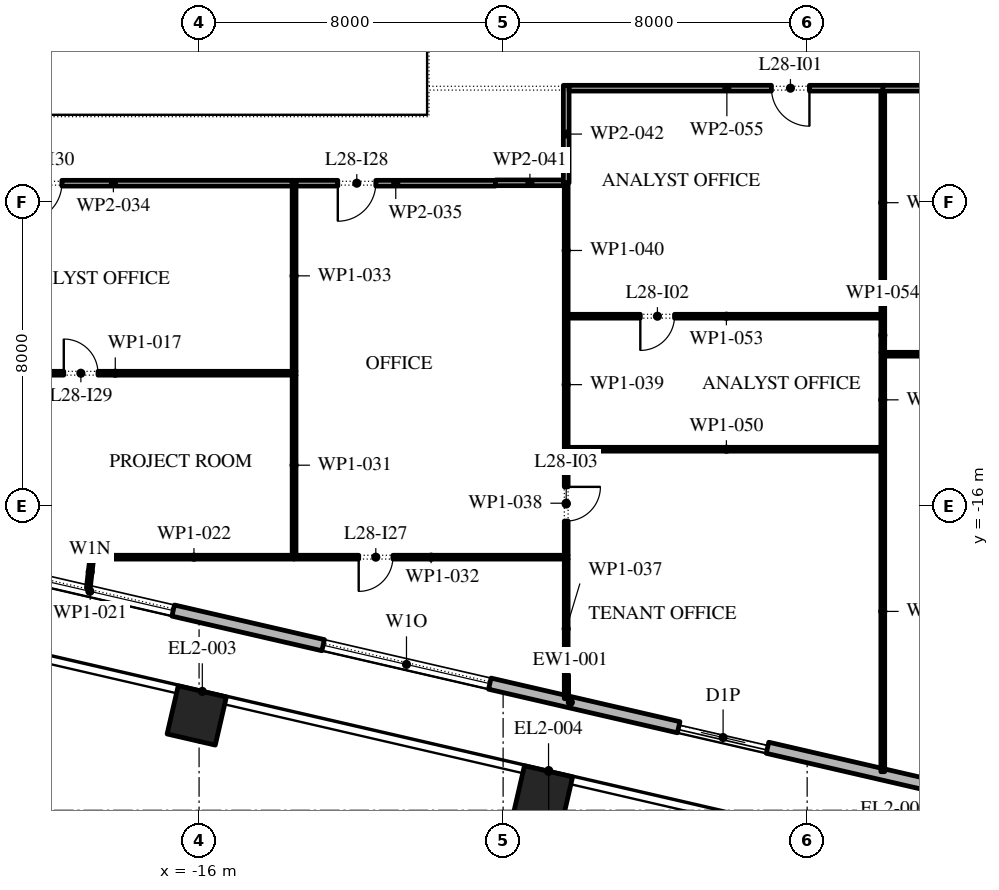
"""IFC4 building model, lengths in metres.
Left out: names, types, materials, properties, quantities, classifications, styles, units other than length and angle.
Written with IfcOpenShell. Run it as: python <this file> out.ifc"""

import sys

from ifc_helpers import new_model, si_unit, direction, frame, frame_2d, origin, origin_2d, place, context, subcontext, project, spatial, rectangle, extrude, element, fill, save


model = new_model("IFC4")
c1 = context("Model", 3, precision=1e-05, world=origin(), true_north=direction((0.0, 1.0)))
c2 = subcontext(c1, "Body", "Model", "MODEL_VIEW")
j1 = project(units=[si_unit("LENGTHUNIT", "METRE"), si_unit("PLANEANGLEUNIT", "RADIAN")], contexts=[c1])
p1 = place(None, origin())
s1 = spatial("IfcSite", under=j1, at=p1, CompositionType="ELEMENT")
p2 = place(p1, origin())
s2 = spatial("IfcBuilding", under=s1, at=p2, CompositionType="ELEMENT")
p3 = place(p2, frame((0.0, 0.0, 130.8)))
s3 = spatial("IfcBuildingStorey", under=s2, at=p3, CompositionType="ELEMENT", Elevation=130.8)
for number, where, z_axis, x_axis in (
    (1, (-16.061, -21.505, 0.0), (0.0, 0.0, 1.0), (0.974, -0.225, 0.0)),
    (2, (-6.951, -23.608, 0.0), (0.0, 0.0, 1.0), (0.974, -0.225, 0.0)),
):
    element("IfcColumn", number, at=place(p3, frame(where, z_axis=z_axis, x_axis=x_axis)), inside=s3, PredefinedType="COLUMN", context=c2, shape_type="SweptSolid", body=[
        extrude(rectangle(XDim=1.3, YDim=1.3, at=origin_2d()), origin(), (0.0, 0.0, 1.0), 4.2),
    ])
p4 = place(p3, frame((-31.078, -15.421, 0.0), z_axis=(0.0, 0.0, 1.0), x_axis=(0.974370456532, -0.224949357493, 0.0)))
e3 = element("IfcWall", 3, at=p4, inside=s3, PredefinedType="STANDARD", context=c2, shape_type="SweptSolid", body=[
    extrude(rectangle(XDim=51.0, YDim=0.3, at=frame_2d((25.5, 0.0))), origin(), (0.0, 0.0, 1.0), 4.0),
])
p5 = place(p4, frame((1.875, 0.0, 0.45)))
e4 = element("IfcOpeningElement", 4, at=p5, cuts=e3, PredefinedType="OPENING", context=c2, shape_type="SweptSolid", body=[
    extrude(rectangle(XDim=4.5, YDim=2.65, at=frame_2d((2.25, 1.325))), frame((0.0, 0.16, 0.0), z_axis=(0.0, -1.0, 0.0), x_axis=(1.0, 0.0, 0.0)), (0.0, 0.0, 1.0), 0.32),
])
p6 = place(p4, frame((10.275, 0.0, 0.45)))
e5 = element("IfcOpeningElement", 5, at=p6, cuts=e3, PredefinedType="OPENING", context=c2, shape_type="SweptSolid", body=[
    extrude(rectangle(XDim=4.5, YDim=2.525, at=frame_2d((2.25, 1.262))), frame((0.0, 0.16, 0.0), z_axis=(0.0, -1.0, 0.0), x_axis=(1.0, 0.0, 0.0)), (0.0, 0.0, 1.0), 0.32),
])
p7 = place(p4, frame((18.825, 0.0, 0.45)))
e6 = element("IfcOpeningElement", 6, at=p7, cuts=e3, PredefinedType="OPENING", context=c2, shape_type="SweptSolid", body=[
    extrude(rectangle(XDim=4.5, YDim=2.5, at=frame_2d((2.25, 1.25))), frame((0.0, 0.16, 0.0), z_axis=(0.0, -1.0, 0.0), x_axis=(1.0, 0.0, 0.0)), (0.0, 0.0, 1.0), 0.32),
])
p8 = place(p4, frame((28.425, 0.0, 0.0)))
e7 = element("IfcOpeningElement", 7, at=p8, cuts=e3, PredefinedType="OPENING", context=c2, shape_type="SweptSolid", body=[
    extrude(rectangle(XDim=2.4, YDim=2.9, at=frame_2d((1.2, 1.45))), frame((0.0, 0.16, 0.0), z_axis=(0.0, -1.0, 0.0), x_axis=(1.0, 0.0, 0.0)), (0.0, 0.0, 1.0), 0.32),
])
p9 = place(p4, frame((35.925, 0.0, 0.45)))
e8 = element("IfcOpeningElement", 8, at=p9, cuts=e3, PredefinedType="OPENING", context=c2, shape_type="SweptSolid", body=[
    extrude(rectangle(XDim=4.5, YDim=2.45, at=frame_2d((2.25, 1.225))), frame((0.0, 0.16, 0.0), z_axis=(0.0, -1.0, 0.0), x_axis=(1.0, 0.0, 0.0)), (0.0, 0.0, 1.0), 0.32),
])
p10 = place(p4, frame((44.475, 0.0, 0.45)))
e9 = element("IfcOpeningElement", 9, at=p10, cuts=e3, PredefinedType="OPENING", context=c2, shape_type="SweptSolid", body=[
    extrude(rectangle(XDim=4.5, YDim=2.45, at=frame_2d((2.25, 1.225))), frame((0.0, 0.16, 0.0), z_axis=(0.0, -1.0, 0.0), x_axis=(1.0, 0.0, 0.0)), (0.0, 0.0, 1.0), 0.32),
])
p11 = place(p3, frame((-22.96, -12.5, 0.0), z_axis=(0.0, 0.0, 1.0), x_axis=(1.0, 0.0, 0.0)))
e10 = element("IfcWall", 10, at=p11, inside=s3, PredefinedType="PARTITIONING", context=c2, shape_type="SweptSolid", body=[
    extrude(rectangle(XDim=9.51, YDim=0.1, at=frame_2d((4.755, 0.0))), origin(), (0.0, 0.0, 1.0), 4.0),
])
p12 = place(p11, frame((3.4, 0.0, 0.0)))
e11 = element("IfcOpeningElement", 11, at=p12, cuts=e10, PredefinedType="OPENING", context=c2, shape_type="SweptSolid", body=[
    extrude(rectangle(XDim=0.9, YDim=2.1, at=frame_2d((0.45, 1.05))), frame((0.0, 0.06, 0.0), z_axis=(0.0, -1.0, 0.0), x_axis=(1.0, 0.0, 0.0)), (0.0, 0.0, 1.0), 0.12),
])
p13 = place(p3, frame((-18.915, -18.157, 0.0), z_axis=(0.0, 0.0, 1.0), x_axis=(0.11580251051, 0.993272258024, 0.0)))
e12 = element("IfcWall", 12, at=p13, inside=s3, PredefinedType="PARTITIONING", context=c2, shape_type="SweptSolid", body=[
    extrude(rectangle(XDim=0.873, YDim=0.1, at=frame_2d((0.437, 0.0))), origin(), (0.0, 0.0, 1.0), 4.0),
])
p14 = place(p3, frame((-18.77, -17.34, 0.0), z_axis=(0.0, 0.0, 1.0), x_axis=(1.0, 0.0, 0.0)))
e13 = element("IfcWall", 13, at=p14, inside=s3, PredefinedType="PARTITIONING", context=c2, shape_type="SweptSolid", body=[
    extrude(rectangle(XDim=5.27, YDim=0.1, at=frame_2d((2.635, 0.0))), origin(), (0.0, 0.0, 1.0), 4.0),
])
p15 = place(p3, frame((-13.5, -17.29, 0.0), z_axis=(0.0, 0.0, 1.0), x_axis=(0.0, 1.0, 0.0)))
e14 = element("IfcWall", 14, at=p15, inside=s3, PredefinedType="PARTITIONING", context=c2, shape_type="SweptSolid", body=[
    extrude(rectangle(XDim=4.74, YDim=0.1, at=frame_2d((2.37, 0.0))), origin(), (0.0, 0.0, 1.0), 4.0),
])
p16 = place(p3, frame((-13.5, -17.34, 0.0), z_axis=(0.0, 0.0, 1.0), x_axis=(1.0, 0.0, 0.0)))
e15 = element("IfcWall", 15, at=p16, inside=s3, PredefinedType="PARTITIONING", context=c2, shape_type="SweptSolid", body=[
    extrude(rectangle(XDim=7.21, YDim=0.1, at=frame_2d((3.605, 0.0))), origin(), (0.0, 0.0, 1.0), 4.0),
])
p17 = place(p16, frame((1.7, 0.0, 0.0)))
e16 = element("IfcOpeningElement", 16, at=p17, cuts=e15, PredefinedType="OPENING", context=c2, shape_type="SweptSolid", body=[
    extrude(rectangle(XDim=0.9, YDim=2.1, at=frame_2d((0.45, 1.05))), frame((0.0, 0.06, 0.0), z_axis=(0.0, -1.0, 0.0), x_axis=(1.0, 0.0, 0.0)), (0.0, 0.0, 1.0), 0.12),
])
p18 = place(p3, frame((-13.5, -12.45, 0.0), z_axis=(0.0, 0.0, 1.0), x_axis=(0.0, 1.0, 0.0)))
e17 = element("IfcWall", 17, at=p18, inside=s3, PredefinedType="PARTITIONING", context=c2, shape_type="SweptSolid", body=[
    extrude(rectangle(XDim=5.025, YDim=0.1, at=frame_2d((2.512, 0.0))), origin(), (0.0, 0.0, 1.0), 4.0),
])
p19 = place(p3, frame((-13.55, -7.5, 0.0), z_axis=(0.0, 0.0, 1.0), x_axis=(-1.0, 0.0, 0.0)))
e18 = element("IfcWall", 18, at=p19, inside=s3, PredefinedType="PARTITIONING", context=c2, shape_type="SweptSolid", body=[
    extrude(rectangle(XDim=9.41, YDim=0.15, at=frame_2d((4.705, 0.0))), origin(), (0.0, 0.0, 1.0), 4.0),
])
p20 = place(p19, frame((6.06, 0.0, 0.0)))
e19 = element("IfcOpeningElement", 19, at=p20, cuts=e18, PredefinedType="OPENING", context=c2, shape_type="SweptSolid", body=[
    extrude(rectangle(XDim=1.0, YDim=2.1, at=frame_2d((0.5, 1.05))), frame((0.0, 0.085, 0.0), z_axis=(0.0, -1.0, 0.0), x_axis=(1.0, 0.0, 0.0)), (0.0, 0.0, 1.0), 0.17),
])
p21 = place(p3, frame((-8.2, -7.5, 0.0), z_axis=(0.0, 0.0, 1.0), x_axis=(-1.0, 0.0, 0.0)))
e20 = element("IfcWall", 20, at=p21, inside=s3, PredefinedType="PARTITIONING", context=c2, shape_type="SweptSolid", body=[
    extrude(rectangle(XDim=5.25, YDim=0.15, at=frame_2d((2.625, 0.0))), origin(), (0.0, 0.0, 1.0), 4.0),
])
p22 = place(p21, frame((3.15, 0.0, 0.0)))
e21 = element("IfcOpeningElement", 21, at=p22, cuts=e20, PredefinedType="OPENING", context=c2, shape_type="SweptSolid", body=[
    extrude(rectangle(XDim=1.0, YDim=2.1, at=frame_2d((0.5, 1.05))), frame((0.0, 0.085, 0.0), z_axis=(0.0, -1.0, 0.0), x_axis=(1.0, 0.0, 0.0)), (0.0, 0.0, 1.0), 0.17),
])
p23 = place(p3, frame((-6.34, -21.061, 0.0), z_axis=(0.0, 0.0, 1.0), x_axis=(0.0, 1.0, 0.0)))
e22 = element("IfcWall", 22, at=p23, inside=s3, PredefinedType="PARTITIONING", context=c2, shape_type="SweptSolid", body=[
    extrude(rectangle(XDim=3.671, YDim=0.1, at=frame_2d((1.835, 0.0))), origin(), (0.0, 0.0, 1.0), 4.0),
])
p24 = place(p3, frame((-6.34, -17.29, 0.0), z_axis=(0.0, 0.0, 1.0), x_axis=(0.0, 1.0, 0.0)))
e23 = element("IfcWall", 23, at=p24, inside=s3, PredefinedType="PARTITIONING", context=c2, shape_type="SweptSolid", body=[
    extrude(rectangle(XDim=2.74, YDim=0.1, at=frame_2d((1.37, 0.0))), origin(), (0.0, 0.0, 1.0), 4.0),
])
p25 = place(p24, frame((0.9, 0.0, 0.0)))
e24 = element("IfcOpeningElement", 24, at=p25, cuts=e23, PredefinedType="OPENING", context=c2, shape_type="SweptSolid", body=[
    extrude(rectangle(XDim=0.9, YDim=2.1, at=frame_2d((0.45, 1.05))), frame((0.0, 0.06, 0.0), z_axis=(0.0, -1.0, 0.0), x_axis=(1.0, 0.0, 0.0)), (0.0, 0.0, 1.0), 0.12),
])
p26 = place(p3, frame((-6.34, -14.55, 0.0), z_axis=(0.0, 0.0, 1.0), x_axis=(0.0, 1.0, 0.0)))
e25 = element("IfcWall", 25, at=p26, inside=s3, PredefinedType="PARTITIONING", context=c2, shape_type="SweptSolid", body=[
    extrude(rectangle(XDim=3.5, YDim=0.1, at=frame_2d((1.75, 0.0))), origin(), (0.0, 0.0, 1.0), 4.0),
])
p27 = place(p3, frame((-6.34, -11.05, 0.0), z_axis=(0.0, 0.0, 1.0), x_axis=(0.0, 1.0, 0.0)))
e26 = element("IfcWall", 26, at=p27, inside=s3, PredefinedType="PARTITIONING", context=c2, shape_type="SweptSolid", body=[
    extrude(rectangle(XDim=3.56, YDim=0.1, at=frame_2d((1.78, 0.0))), origin(), (0.0, 0.0, 1.0), 4.0),
])
p28 = place(p3, frame((-6.39, -7.49, 0.0), z_axis=(0.0, 0.0, 1.0), x_axis=(-1.0, 0.0, 0.0)))
e27 = element("IfcWall", 27, at=p28, inside=s3, PredefinedType="PARTITIONING", context=c2, shape_type="SweptSolid", body=[
    extrude(rectangle(XDim=1.81, YDim=0.15, at=frame_2d((0.905, 0.0))), origin(), (0.0, 0.0, 1.0), 4.0),
])
p29 = place(p3, frame((-6.34, -4.925, 0.0), z_axis=(0.0, 0.0, 1.0), x_axis=(0.0, -1.0, 0.0)))
e28 = element("IfcWall", 28, at=p29, inside=s3, PredefinedType="PARTITIONING", context=c2, shape_type="SweptSolid", body=[
    extrude(rectangle(XDim=2.565, YDim=0.15, at=frame_2d((1.282, 0.0))), origin(), (0.0, 0.0, 1.0), 4.0),
])
p30 = place(p3, frame((2.04, -14.5, 0.0), z_axis=(0.0, 0.0, 1.0), x_axis=(-1.0, 0.0, 0.0)))
e29 = element("IfcWall", 29, at=p30, inside=s3, PredefinedType="PARTITIONING", context=c2, shape_type="SweptSolid", body=[
    extrude(rectangle(XDim=8.33, YDim=0.1, at=frame_2d((4.165, 0.0))), origin(), (0.0, 0.0, 1.0), 4.0),
])
p31 = place(p3, frame((1.99, -14.55, 0.0), z_axis=(0.0, 0.0, 1.0), x_axis=(0.0, -1.0, 0.0)))
e30 = element("IfcWall", 30, at=p31, inside=s3, PredefinedType="PARTITIONING", context=c2, shape_type="SweptSolid", body=[
    extrude(rectangle(XDim=8.434, YDim=0.1, at=frame_2d((4.217, 0.0))), origin(), (0.0, 0.0, 1.0), 4.0),
])
p32 = place(p3, frame((1.99, -11.95, 0.0), z_axis=(0.0, 0.0, 1.0), x_axis=(0.0, -1.0, 0.0)))
e31 = element("IfcWall", 31, at=p32, inside=s3, PredefinedType="PARTITIONING", context=c2, shape_type="SweptSolid", body=[
    extrude(rectangle(XDim=2.5, YDim=0.1, at=frame_2d((1.25, 0.0))), origin(), (0.0, 0.0, 1.0), 4.0),
])
p33 = place(p3, frame((2.04, -11.0, 0.0), z_axis=(0.0, 0.0, 1.0), x_axis=(-1.0, 0.0, 0.0)))
e32 = element("IfcWall", 32, at=p33, inside=s3, PredefinedType="PARTITIONING", context=c2, shape_type="SweptSolid", body=[
    extrude(rectangle(XDim=8.33, YDim=0.1, at=frame_2d((4.165, 0.0))), origin(), (0.0, 0.0, 1.0), 4.0),
])
p34 = place(p33, frame((5.53, 0.0, 0.0)))
e33 = element("IfcOpeningElement", 33, at=p34, cuts=e32, PredefinedType="OPENING", context=c2, shape_type="SweptSolid", body=[
    extrude(rectangle(XDim=0.9, YDim=2.1, at=frame_2d((0.45, 1.05))), frame((0.0, 0.06, 0.0), z_axis=(0.0, -1.0, 0.0), x_axis=(1.0, 0.0, 0.0)), (0.0, 0.0, 1.0), 0.12),
])
p35 = place(p3, frame((1.99, -11.05, 0.0), z_axis=(0.0, 0.0, 1.0), x_axis=(0.0, -1.0, 0.0)))
e34 = element("IfcWall", 34, at=p35, inside=s3, PredefinedType="PARTITIONING", context=c2, shape_type="SweptSolid", body=[
    extrude(rectangle(XDim=0.9, YDim=0.1, at=frame_2d((0.45, 0.0))), origin(), (0.0, 0.0, 1.0), 4.0),
])
p36 = place(p3, frame((2.04, -5.0, 0.0), z_axis=(0.0, 0.0, 1.0), x_axis=(-1.0, 0.0, 0.0)))
e35 = element("IfcWall", 35, at=p36, inside=s3, PredefinedType="PARTITIONING", context=c2, shape_type="SweptSolid", body=[
    extrude(rectangle(XDim=8.305, YDim=0.15, at=frame_2d((4.152, 0.0))), origin(), (0.0, 0.0, 1.0), 4.0),
])
p37 = place(p36, frame((1.98, 0.0, 0.0)))
e36 = element("IfcOpeningElement", 36, at=p37, cuts=e35, PredefinedType="OPENING", context=c2, shape_type="SweptSolid", body=[
    extrude(rectangle(XDim=1.0, YDim=2.1, at=frame_2d((0.5, 1.05))), frame((0.0, 0.085, 0.0), z_axis=(0.0, -1.0, 0.0), x_axis=(1.0, 0.0, 0.0)), (0.0, 0.0, 1.0), 0.17),
])
p38 = place(p3, frame((1.99, -5.075, 0.0), z_axis=(0.0, 0.0, 1.0), x_axis=(0.0, -1.0, 0.0)))
e37 = element("IfcWall", 37, at=p38, inside=s3, PredefinedType="PARTITIONING", context=c2, shape_type="SweptSolid", body=[
    extrude(rectangle(XDim=5.875, YDim=0.1, at=frame_2d((2.938, 0.0))), origin(), (0.0, 0.0, 1.0), 4.0),
])
p39 = place(p3, frame((8.125, -5.0, 0.0), z_axis=(0.0, 0.0, 1.0), x_axis=(-1.0, 0.0, 0.0)))
e38 = element("IfcWall", 38, at=p39, inside=s3, PredefinedType="PARTITIONING", context=c2, shape_type="SweptSolid", body=[
    extrude(rectangle(XDim=6.135, YDim=0.15, at=frame_2d((3.067, 0.0))), origin(), (0.0, 0.0, 1.0), 4.0),
])
p40 = place(p3, frame((14.72, -12.0, 0.0), z_axis=(0.0, 0.0, 1.0), x_axis=(-1.0, 0.0, 0.0)))
e39 = element("IfcWall", 39, at=p40, inside=s3, PredefinedType="PARTITIONING", context=c2, shape_type="SweptSolid", body=[
    extrude(rectangle(XDim=12.68, YDim=0.1, at=frame_2d((6.34, 0.0))), origin(), (0.0, 0.0, 1.0), 4.0),
])
p41 = place(p40, frame((5.88, 0.0, 0.0)))
e40 = element("IfcOpeningElement", 40, at=p41, cuts=e39, PredefinedType="OPENING", context=c2, shape_type="SweptSolid", body=[
    extrude(rectangle(XDim=0.9, YDim=2.1, at=frame_2d((0.45, 1.05))), frame((0.0, 0.06, 0.0), z_axis=(0.0, -1.0, 0.0), x_axis=(1.0, 0.0, 0.0)), (0.0, 0.0, 1.0), 0.12),
])
p42 = place(p6, origin())
e41 = element("IfcWindow", 41, at=p42, inside=s3, PartitioningType="DOUBLE_PANEL_VERTICAL", PredefinedType="WINDOW", context=c2, shape_type="SweptSolid", body=[
    extrude(rectangle(XDim=4.5, YDim=2.525, at=frame_2d((2.25, 1.262))), frame((0.0, 0.03, 0.0), z_axis=(0.0, -1.0, 0.0), x_axis=(1.0, 0.0, 0.0)), (0.0, 0.0, 1.0), 0.06),
])
fill(e5, e41)
p43 = place(p7, origin())
e42 = element("IfcWindow", 42, at=p43, inside=s3, PartitioningType="DOUBLE_PANEL_VERTICAL", PredefinedType="WINDOW", context=c2, shape_type="SweptSolid", body=[
    extrude(rectangle(XDim=4.5, YDim=2.5, at=frame_2d((2.25, 1.25))), frame((0.0, 0.03, 0.0), z_axis=(0.0, -1.0, 0.0), x_axis=(1.0, 0.0, 0.0)), (0.0, 0.0, 1.0), 0.06),
])
fill(e6, e42)
p44 = place(p8, origin())
e43 = element("IfcDoor", 43, at=p44, inside=s3, OperationType="DOUBLE_DOOR_SLIDING", PredefinedType="DOOR", context=c2, shape_type="SweptSolid", body=[
    extrude(rectangle(XDim=2.4, YDim=2.9, at=frame_2d((1.2, 1.45))), frame((0.0, 0.025, 0.0), z_axis=(0.0, -1.0, 0.0), x_axis=(1.0, 0.0, 0.0)), (0.0, 0.0, 1.0), 0.05),
])
fill(e7, e43)
p45 = place(p37, origin())
e44 = element("IfcDoor", 44, at=p45, inside=s3, OperationType="SINGLE_SWING_RIGHT", PredefinedType="DOOR", context=c2, shape_type="SweptSolid", body=[
    extrude(rectangle(XDim=1.0, YDim=2.1, at=frame_2d((0.5, 1.05))), frame((0.0, 0.025, 0.0), z_axis=(0.0, -1.0, 0.0), x_axis=(1.0, 0.0, 0.0)), (0.0, 0.0, 1.0), 0.05),
])
fill(e36, e44)
p46 = place(p34, origin())
e45 = element("IfcDoor", 45, at=p46, inside=s3, OperationType="SINGLE_SWING_LEFT", PredefinedType="DOOR", context=c2, shape_type="SweptSolid", body=[
    extrude(rectangle(XDim=0.9, YDim=2.1, at=frame_2d((0.45, 1.05))), frame((0.0, 0.025, 0.0), z_axis=(0.0, -1.0, 0.0), x_axis=(1.0, 0.0, 0.0)), (0.0, 0.0, 1.0), 0.05),
])
fill(e33, e45)
p47 = place(p25, frame((0.9, 0.0, 0.0), z_axis=(0.0, 0.0, 1.0), x_axis=(-1.0, 0.0, 0.0)))
e46 = element("IfcDoor", 46, at=p47, inside=s3, OperationType="SINGLE_SWING_RIGHT", PredefinedType="DOOR", context=c2, shape_type="SweptSolid", body=[
    extrude(rectangle(XDim=0.9, YDim=2.1, at=frame_2d((0.45, 1.05))), frame((0.0, 0.025, 0.0), z_axis=(0.0, -1.0, 0.0), x_axis=(1.0, 0.0, 0.0)), (0.0, 0.0, 1.0), 0.05),
])
fill(e24, e46)
p48 = place(p17, frame((0.9, 0.0, 0.0), z_axis=(0.0, 0.0, 1.0), x_axis=(-1.0, 0.0, 0.0)))
e47 = element("IfcDoor", 47, at=p48, inside=s3, OperationType="SINGLE_SWING_LEFT", PredefinedType="DOOR", context=c2, shape_type="SweptSolid", body=[
    extrude(rectangle(XDim=0.9, YDim=2.1, at=frame_2d((0.45, 1.05))), frame((0.0, 0.025, 0.0), z_axis=(0.0, -1.0, 0.0), x_axis=(1.0, 0.0, 0.0)), (0.0, 0.0, 1.0), 0.05),
])
fill(e16, e47)
p49 = place(p22, origin())
e48 = element("IfcDoor", 48, at=p49, inside=s3, OperationType="SINGLE_SWING_LEFT", PredefinedType="DOOR", context=c2, shape_type="SweptSolid", body=[
    extrude(rectangle(XDim=1.0, YDim=2.1, at=frame_2d((0.5, 1.05))), frame((0.0, 0.025, 0.0), z_axis=(0.0, -1.0, 0.0), x_axis=(1.0, 0.0, 0.0)), (0.0, 0.0, 1.0), 0.05),
])
fill(e21, e48)
p50 = place(p12, origin())
e49 = element("IfcDoor", 49, at=p50, inside=s3, OperationType="SINGLE_SWING_RIGHT", PredefinedType="DOOR", context=c2, shape_type="SweptSolid", body=[
    extrude(rectangle(XDim=0.9, YDim=2.1, at=frame_2d((0.45, 1.05))), frame((0.0, 0.025, 0.0), z_axis=(0.0, -1.0, 0.0), x_axis=(1.0, 0.0, 0.0)), (0.0, 0.0, 1.0), 0.05),
])
fill(e11, e49)
p51 = place(p20, origin())
e50 = element("IfcDoor", 50, at=p51, inside=s3, OperationType="SINGLE_SWING_LEFT", PredefinedType="DOOR", context=c2, shape_type="SweptSolid", body=[
    extrude(rectangle(XDim=1.0, YDim=2.1, at=frame_2d((0.5, 1.05))), frame((0.0, 0.025, 0.0), z_axis=(0.0, -1.0, 0.0), x_axis=(1.0, 0.0, 0.0)), (0.0, 0.0, 1.0), 0.05),
])
fill(e19, e50)
save(model, sys.argv[1])
